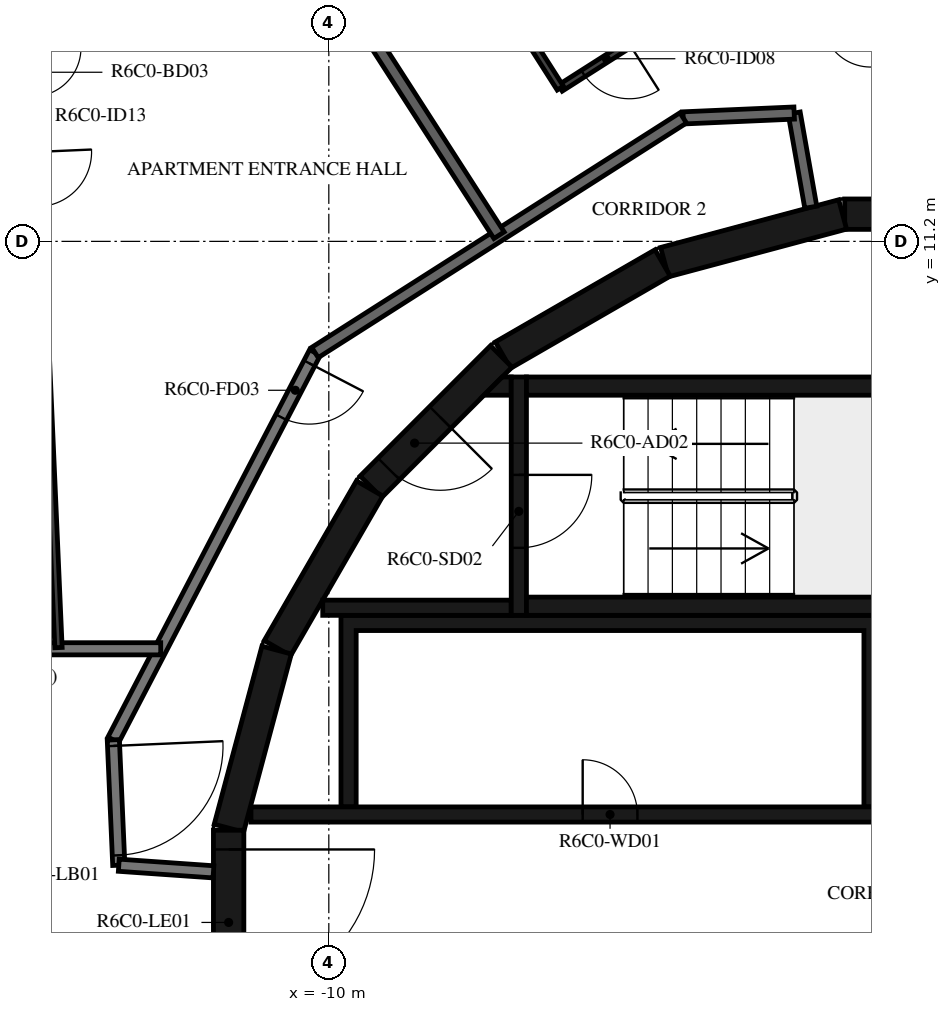
"""IFC4 building model, lengths in metres.
Left out: names, types, materials, properties, quantities, classifications, styles, units other than length and angle.
Written with IfcOpenShell. Run it as: python <this file> out.ifc"""

import sys

from ifc_helpers import new_model, si_unit, direction, frame, frame_2d, origin, place, context, subcontext, project, spatial, polyline, rectangle, outline, extrude, element, fill, save


model = new_model("IFC4")
c1 = context("Model", 3, precision=1e-05, world=origin(), true_north=direction((0.0, 1.0)))
c2 = subcontext(c1, "Body", "Model", "MODEL_VIEW")
j1 = project(units=[si_unit("LENGTHUNIT", "METRE"), si_unit("PLANEANGLEUNIT", "RADIAN")], contexts=[c1])
p1 = place(None, origin())
s1 = spatial("IfcSite", under=j1, at=p1, CompositionType="ELEMENT")
p2 = place(p1, origin())
s2 = spatial("IfcBuilding", under=s1, at=p2, CompositionType="ELEMENT")
p3 = place(p2, frame((0.0, 0.0, 254.7)))
s3 = spatial("IfcBuildingStorey", under=s2, at=p3, CompositionType="ELEMENT", Elevation=254.7)
for number, where, z_axis, x_axis in (
    (1, (1.516, 11.647, 0.0), (0.0, 0.0, 1.0), (-1.0, 0.0, 0.0)),
    (2, (-1.55, 11.643, 0.0), (0.0, 0.0, 1.0), (-0.966, -0.259, 0.0)),
    (3, (-4.51, 10.845, 0.0), (0.0, 0.0, 1.0), (-0.866, -0.5, 0.0)),
):
    element("IfcWall", number, at=place(p3, frame(where, z_axis=z_axis, x_axis=x_axis)), inside=s3, PredefinedType="SHEAR", context=c2, shape_type="SweptSolid", body=[
        extrude(rectangle(XDim=3.033, YDim=0.5, at=frame_2d((1.516, 0.0))), origin(), (0.0, 0.0, 1.0), 3.05),
    ])
p4 = place(p3, frame((-7.164, 9.308, 0.0), z_axis=(0.0, 0.0, 1.0), x_axis=(-0.707106781187, -0.707106781187, 0.0)))
e4 = element("IfcWall", 4, at=p4, inside=s3, PredefinedType="SHEAR", context=c2, shape_type="SweptSolid", body=[
    extrude(rectangle(XDim=3.032, YDim=0.5, at=frame_2d((1.516, 0.0))), origin(), (0.0, 0.0, 1.0), 3.05),
])
p5 = place(p4, frame((1.416, 0.0, 0.0)))
e5 = element("IfcOpeningElement", 5, at=p5, cuts=e4, PredefinedType="OPENING", context=c2, shape_type="SweptSolid", body=[
    extrude(rectangle(XDim=1.2, YDim=2.1, at=frame_2d((0.6, 1.05))), frame((0.0, 0.26, 0.0), z_axis=(0.0, -1.0, 0.0), x_axis=(1.0, 0.0, 0.0)), (0.0, 0.0, 1.0), 0.52),
])
for number, where, z_axis, x_axis in (
    (6, (-9.329, 7.137, 0.0), (0.0, 0.0, 1.0), (-0.5, -0.866, 0.0)),
    (7, (-10.858, 4.479, 0.0), (0.0, 0.0, 1.0), (-0.259, -0.966, 0.0)),
):
    element("IfcWall", number, at=place(p3, frame(where, z_axis=z_axis, x_axis=x_axis)), inside=s3, PredefinedType="SHEAR", context=c2, shape_type="SweptSolid", body=[
        extrude(rectangle(XDim=3.033, YDim=0.5, at=frame_2d((1.516, 0.0))), origin(), (0.0, 0.0, 1.0), 3.05),
    ])
p6 = place(p3, frame((-11.647, 1.516, 0.0), z_axis=(0.0, 0.0, 1.0), x_axis=(0.0, -1.0, 0.0)))
e8 = element("IfcWall", 8, at=p6, inside=s3, PredefinedType="SHEAR", context=c2, shape_type="SweptSolid", body=[
    extrude(rectangle(XDim=3.033, YDim=0.5, at=frame_2d((1.516, 0.0))), origin(), (0.0, 0.0, 1.0), 3.05),
])
p7 = place(p6, frame((0.316, 0.0, 0.0)))
e9 = element("IfcOpeningElement", 9, at=p7, cuts=e8, PredefinedType="OPENING", context=c2, shape_type="SweptSolid", body=[
    extrude(rectangle(XDim=2.4, YDim=2.1, at=frame_2d((1.2, 1.05))), frame((0.0, 0.26, 0.0), z_axis=(0.0, -1.0, 0.0), x_axis=(1.0, 0.0, 0.0)), (0.0, 0.0, 1.0), 0.52),
])
for number, where, z_axis, x_axis in (
    (10, (-6.75, 5.2, 0.0), (0.0, 0.0, 1.0), (1.0, 0.0, 0.0)),
    (11, (-6.75, 8.82, 0.0), (0.0, 0.0, 1.0), (1.0, 0.0, 0.0)),
):
    element("IfcWall", number, at=place(p3, frame(where, z_axis=z_axis, x_axis=x_axis)), inside=s3, PredefinedType="SHEAR", context=c2, shape_type="SweptSolid", body=[
        extrude(rectangle(XDim=6.75, YDim=0.3, at=frame_2d((3.375, 0.0))), origin(), (0.0, 0.0, 1.0), 3.05),
    ])
p8 = place(p3, frame((-6.875, 8.97, 0.0), z_axis=(0.0, 0.0, 1.0), x_axis=(0.0, -1.0, 0.0)))
e12 = element("IfcWall", 12, at=p8, inside=s3, PredefinedType="SHEAR", context=c2, shape_type="SweptSolid", body=[
    extrude(rectangle(XDim=3.92, YDim=0.25, at=frame_2d((1.96, 0.0))), origin(), (0.0, 0.0, 1.0), 3.05),
])
p9 = place(p8, frame((1.61, 0.0, 0.0)))
e13 = element("IfcOpeningElement", 13, at=p9, cuts=e12, PredefinedType="OPENING", context=c2, shape_type="SweptSolid", body=[
    extrude(rectangle(XDim=1.2, YDim=2.1, at=frame_2d((0.6, 1.05))), frame((0.0, 0.135, 0.0), z_axis=(0.0, -1.0, 0.0), x_axis=(1.0, 0.0, 0.0)), (0.0, 0.0, 1.0), 0.27),
])
p10 = place(p3, frame((-7.0, 5.175, 0.0), z_axis=(0.0, 0.0, 1.0), x_axis=(-1.0, 0.0, 0.0)))
e14 = element("IfcWall", 14, at=p10, inside=s3, PredefinedType="SHEAR", context=c2, shape_type="SweptSolid", body=[
    extrude(rectangle(XDim=3.1, YDim=0.25, at=frame_2d((1.55, 0.0))), origin(), (0.0, 0.0, 1.0), 3.05),
])
p11 = place(p3, origin())
e15 = element("IfcWall", 15, at=p11, inside=s3, PredefinedType="SHEAR", context=c2, shape_type="SweptSolid", body=[
    extrude(outline(polyline([(-7.148, 8.97), (-7.0, 8.97), (-7.0, 8.67), (-7.448, 8.67), (-7.148, 8.97)])), origin(), (0.0, 0.0, 1.0), 3.05),
])
p12 = place(p3, origin())
e16 = element("IfcWall", 16, at=p12, inside=s3, PredefinedType="SHEAR", context=c2, shape_type="SweptSolid", body=[
    extrude(outline(polyline([(-9.55, 4.8), (-1.2, 4.8), (-1.2, 1.9), (-0.95, 1.9), (-0.95, 4.8), (0.95, 4.8), (0.95, 1.9), (1.2, 1.9), (1.2, 4.8), (3.1, 4.8), (3.1, 1.9), (3.35, 1.9), (3.35, 4.8), (5.25, 4.8), (5.25, 1.9), (5.5, 1.9), (5.5, 4.8), (7.4, 4.8), (7.4, 1.9), (7.65, 1.9), (7.65, 4.8), (9.55, 4.8), (9.55, 1.9), (9.8, 1.9), (9.8, 4.8), (9.8, 5.05), (-9.8, 5.05), (-9.8, 4.8), (-9.8, 1.9), (-9.55, 1.9), (-9.55, 4.8)])), origin(), (0.0, 0.0, 1.0), 3.05),
])
p13 = place(p3, frame((-11.28, 1.775, 0.0), z_axis=(0.0, 0.0, 1.0), x_axis=(1.0, 0.0, 0.0)))
e17 = element("IfcWall", 17, at=p13, inside=s3, PredefinedType="SHEAR", context=c2, shape_type="SweptSolid", body=[
    extrude(rectangle(XDim=14.38, YDim=0.25, at=frame_2d((7.19, 0.0))), origin(), (0.0, 0.0, 1.0), 3.05),
])
p14 = place(p13, frame((10.73, 0.0, 0.0)))
e18 = element("IfcOpeningElement", 18, at=p14, cuts=e17, PredefinedType="OPENING", context=c2, shape_type="SweptSolid", body=[
    extrude(rectangle(XDim=1.1, YDim=2.1, at=frame_2d((0.55, 1.05))), frame((0.0, 0.135, 0.0), z_axis=(0.0, -1.0, 0.0), x_axis=(1.0, 0.0, 0.0)), (0.0, 0.0, 1.0), 0.27),
])
p15 = place(p13, frame((12.88, 0.0, 0.0)))
e19 = element("IfcOpeningElement", 19, at=p15, cuts=e17, PredefinedType="OPENING", context=c2, shape_type="SweptSolid", body=[
    extrude(rectangle(XDim=1.1, YDim=2.1, at=frame_2d((0.55, 1.05))), frame((0.0, 0.135, 0.0), z_axis=(0.0, -1.0, 0.0), x_axis=(1.0, 0.0, 0.0)), (0.0, 0.0, 1.0), 0.27),
])
p16 = place(p13, frame((5.455, 0.0, 0.0)))
e20 = element("IfcOpeningElement", 20, at=p16, cuts=e17, PredefinedType="OPENING", context=c2, shape_type="SweptSolid", body=[
    extrude(rectangle(XDim=0.9, YDim=2.1, at=frame_2d((0.45, 1.05))), frame((0.0, 0.135, 0.0), z_axis=(0.0, -1.0, 0.0), x_axis=(1.0, 0.0, 0.0)), (0.0, 0.0, 1.0), 0.27),
])
p17 = place(p3, frame((-10.228, 9.372, 0.0), z_axis=(0.0, 0.0, 1.0), x_axis=(-0.461759464021, -0.887005184532, 0.0)))
e21 = element("IfcWall", 21, at=p17, inside=s3, PredefinedType="STANDARD", context=c2, shape_type="SweptSolid", body=[
    extrude(rectangle(XDim=7.181, YDim=0.2, at=frame_2d((3.591, 0.0))), origin(), (0.0, 0.0, 1.0), 3.05),
])
p18 = place(p17, frame((0.2, 0.0, 0.0)))
e22 = element("IfcOpeningElement", 22, at=p18, cuts=e21, PredefinedType="OPENING", context=c2, shape_type="SweptSolid", body=[
    extrude(rectangle(XDim=1.0, YDim=2.1, at=frame_2d((0.5, 1.05))), frame((0.0, 0.11, 0.0), z_axis=(0.0, -1.0, 0.0), x_axis=(1.0, 0.0, 0.0)), (0.0, 0.0, 1.0), 0.22),
])
p19 = place(p3, frame((-13.544, 3.003, 0.0), z_axis=(0.0, 0.0, 1.0), x_axis=(0.043652842459, -0.99904676034, 0.0)))
e23 = element("IfcWall", 23, at=p19, inside=s3, PredefinedType="STANDARD", context=c2, shape_type="SweptSolid", body=[
    extrude(rectangle(XDim=2.064, YDim=0.2, at=frame_2d((1.032, 0.0))), origin(), (0.0, 0.0, 1.0), 3.05),
])
p20 = place(p19, frame((0.1, 0.0, 0.0)))
e24 = element("IfcOpeningElement", 24, at=p20, cuts=e23, PredefinedType="OPENING", context=c2, shape_type="SweptSolid", body=[
    extrude(rectangle(XDim=1.8, YDim=2.1, at=frame_2d((0.9, 1.05))), frame((0.0, 0.11, 0.0), z_axis=(0.0, -1.0, 0.0), x_axis=(1.0, 0.0, 0.0)), (0.0, 0.0, 1.0), 0.22),
])
p21 = place(p3, frame((-13.454, 0.941, 0.0), z_axis=(0.0, 0.0, 1.0), x_axis=(0.99755155062, -0.069934997354, 0.0)))
e25 = element("IfcWall", 25, at=p21, inside=s3, PredefinedType="STANDARD", context=c2, shape_type="SweptSolid", body=[
    extrude(rectangle(XDim=1.561, YDim=0.2, at=frame_2d((0.78, 0.0))), origin(), (0.0, 0.0, 1.0), 3.05),
])
p22 = place(p3, frame((-2.074, 11.761, 0.0), z_axis=(0.0, 0.0, 1.0), x_axis=(-0.173679082312, 0.984802303189, 0.0)))
e26 = element("IfcWall", 26, at=p22, inside=s3, PredefinedType="STANDARD", context=c2, shape_type="SweptSolid", body=[
    extrude(rectangle(XDim=1.573, YDim=0.2, at=frame_2d((0.787, 0.0))), origin(), (0.0, 0.0, 1.0), 3.05),
])
p23 = place(p3, frame((-2.347, 13.31, 0.0), z_axis=(0.0, 0.0, 1.0), x_axis=(-0.999050095671, -0.043576442492, 0.0)))
e27 = element("IfcWall", 27, at=p23, inside=s3, PredefinedType="STANDARD", context=c2, shape_type="SweptSolid", body=[
    extrude(rectangle(XDim=1.826, YDim=0.2, at=frame_2d((0.913, 0.0))), origin(), (0.0, 0.0, 1.0), 3.05),
])
p24 = place(p3, frame((-4.172, 13.231, 0.0), z_axis=(0.0, 0.0, 1.0), x_axis=(-0.843388394728, -0.537304397561, 0.0)))
e28 = element("IfcWall", 28, at=p24, inside=s3, PredefinedType="STANDARD", context=c2, shape_type="SweptSolid", body=[
    extrude(rectangle(XDim=7.181, YDim=0.2, at=frame_2d((3.59, 0.0))), origin(), (0.0, 0.0, 1.0), 3.05),
])
p25 = place(p3, frame((-12.764, 4.5, 0.0), z_axis=(0.0, 0.0, 1.0), x_axis=(-1.0, 0.0, 0.0)))
e29 = element("IfcWall", 29, at=p25, inside=s3, PredefinedType="STANDARD", context=c2, shape_type="SweptSolid", body=[
    extrude(rectangle(XDim=5.135, YDim=0.2, at=frame_2d((2.568, 0.0))), origin(), (0.0, 0.0, 1.0), 3.05),
])
p26 = place(p3, frame((-9.69, 15.171, 0.0), z_axis=(0.0, 0.0, 1.0), x_axis=(0.540961372678, -0.841047438181, 0.0)))
e30 = element("IfcWall", 30, at=p26, inside=s3, PredefinedType="STANDARD", context=c2, shape_type="SweptSolid", body=[
    extrude(rectangle(XDim=4.602, YDim=0.2, at=frame_2d((2.301, 0.0))), origin(), (0.0, 0.0, 1.0), 3.05),
])
p27 = place(p3, frame((-4.888, 14.553, 0.0), z_axis=(0.0, 0.0, 1.0), x_axis=(-0.843349608892, -0.537365273517, 0.0)))
e31 = element("IfcWall", 31, at=p27, inside=s3, PredefinedType="PARTITIONING", context=c2, shape_type="SweptSolid", body=[
    extrude(rectangle(XDim=1.548, YDim=0.12, at=frame_2d((0.774, 0.0))), origin(), (0.0, 0.0, 1.0), 3.05),
])
p28 = place(p27, frame((0.2, 0.0, 0.0)))
e32 = element("IfcOpeningElement", 32, at=p28, cuts=e31, PredefinedType="OPENING", context=c2, shape_type="SweptSolid", body=[
    extrude(rectangle(XDim=0.9, YDim=2.1, at=frame_2d((0.45, 1.05))), frame((0.0, 0.07, 0.0), z_axis=(0.0, -1.0, 0.0), x_axis=(1.0, 0.0, 0.0)), (0.0, 0.0, 1.0), 0.14),
])
p29 = place(p3, frame((-6.194, 13.721, 0.0), z_axis=(0.0, 0.0, 1.0), x_axis=(-0.537316807294, 0.843380488629, 0.0)))
e33 = element("IfcWall", 33, at=p29, inside=s3, PredefinedType="PARTITIONING", context=c2, shape_type="SweptSolid", body=[
    extrude(rectangle(XDim=4.331, YDim=0.12, at=frame_2d((2.165, 0.0))), origin(), (0.0, 0.0, 1.0), 3.05),
])
p30 = place(p3, frame((-14.955, 16.187, 0.0), z_axis=(0.0, 0.0, 1.0), x_axis=(0.04360777668, -0.999048728448, 0.0)))
e34 = element("IfcWall", 34, at=p30, inside=s3, PredefinedType="PARTITIONING", context=c2, shape_type="SweptSolid", body=[
    extrude(rectangle(XDim=11.679, YDim=0.12, at=frame_2d((5.839, 0.0))), origin(), (0.0, 0.0, 1.0), 3.05),
])
p31 = place(p30, frame((1.808, 0.0, 0.0)))
e35 = element("IfcOpeningElement", 35, at=p31, cuts=e34, PredefinedType="OPENING", context=c2, shape_type="SweptSolid", body=[
    extrude(rectangle(XDim=0.8, YDim=2.1, at=frame_2d((0.4, 1.05))), frame((0.0, 0.07, 0.0), z_axis=(0.0, -1.0, 0.0), x_axis=(1.0, 0.0, 0.0)), (0.0, 0.0, 1.0), 0.14),
])
p32 = place(p30, frame((3.519, 0.0, 0.0)))
e36 = element("IfcOpeningElement", 36, at=p32, cuts=e34, PredefinedType="OPENING", context=c2, shape_type="SweptSolid", body=[
    extrude(rectangle(XDim=0.9, YDim=2.1, at=frame_2d((0.45, 1.05))), frame((0.0, 0.07, 0.0), z_axis=(0.0, -1.0, 0.0), x_axis=(1.0, 0.0, 0.0)), (0.0, 0.0, 1.0), 0.14),
])
p33 = place(p9, origin())
e37 = element("IfcDoor", 37, at=p33, inside=s3, OperationType="SINGLE_SWING_LEFT", PredefinedType="DOOR", context=c2, shape_type="SweptSolid", body=[
    extrude(rectangle(XDim=1.2, YDim=2.1, at=frame_2d((0.6, 1.05))), frame((0.0, 0.025, 0.0), z_axis=(0.0, -1.0, 0.0), x_axis=(1.0, 0.0, 0.0)), (0.0, 0.0, 1.0), 0.05),
])
fill(e13, e37)
p34 = place(p5, origin())
e38 = element("IfcDoor", 38, at=p34, inside=s3, OperationType="SINGLE_SWING_RIGHT", PredefinedType="DOOR", context=c2, shape_type="SweptSolid", body=[
    extrude(rectangle(XDim=1.2, YDim=2.1, at=frame_2d((0.6, 1.05))), frame((0.0, 0.025, 0.0), z_axis=(0.0, -1.0, 0.0), x_axis=(1.0, 0.0, 0.0)), (0.0, 0.0, 1.0), 0.05),
])
fill(e5, e38)
p35 = place(p7, origin())
e39 = element("IfcDoor", 39, at=p35, inside=s3, OperationType="DOUBLE_DOOR_SINGLE_SWING", PredefinedType="DOOR", context=c2, shape_type="SweptSolid", body=[
    extrude(rectangle(XDim=2.4, YDim=2.1, at=frame_2d((1.2, 1.05))), frame((0.0, 0.025, 0.0), z_axis=(0.0, -1.0, 0.0), x_axis=(1.0, 0.0, 0.0)), (0.0, 0.0, 1.0), 0.05),
])
fill(e9, e39)
p36 = place(p16, origin())
e40 = element("IfcDoor", 40, at=p36, inside=s3, OperationType="SINGLE_SWING_LEFT", PredefinedType="DOOR", context=c2, shape_type="SweptSolid", body=[
    extrude(rectangle(XDim=0.9, YDim=2.1, at=frame_2d((0.45, 1.05))), frame((0.0, 0.025, 0.0), z_axis=(0.0, -1.0, 0.0), x_axis=(1.0, 0.0, 0.0)), (0.0, 0.0, 1.0), 0.05),
])
fill(e20, e40)
p37 = place(p28, origin())
e41 = element("IfcDoor", 41, at=p37, inside=s3, OperationType="SINGLE_SWING_RIGHT", PredefinedType="DOOR", context=c2, shape_type="SweptSolid", body=[
    extrude(rectangle(XDim=0.9, YDim=2.1, at=frame_2d((0.45, 1.05))), frame((0.0, 0.025, 0.0), z_axis=(0.0, -1.0, 0.0), x_axis=(1.0, 0.0, 0.0)), (0.0, 0.0, 1.0), 0.05),
])
fill(e32, e41)
p38 = place(p18, origin())
e42 = element("IfcDoor", 42, at=p38, inside=s3, OperationType="SINGLE_SWING_LEFT", PredefinedType="DOOR", context=c2, shape_type="SweptSolid", body=[
    extrude(rectangle(XDim=1.0, YDim=2.1, at=frame_2d((0.5, 1.05))), frame((0.0, 0.025, 0.0), z_axis=(0.0, -1.0, 0.0), x_axis=(1.0, 0.0, 0.0)), (0.0, 0.0, 1.0), 0.05),
])
fill(e22, e42)
p39 = place(p20, origin())
e43 = element("IfcDoor", 43, at=p39, inside=s3, OperationType="DOUBLE_DOOR_SINGLE_SWING", PredefinedType="DOOR", context=c2, shape_type="SweptSolid", body=[
    extrude(rectangle(XDim=1.8, YDim=2.1, at=frame_2d((0.9, 1.05))), frame((0.0, 0.025, 0.0), z_axis=(0.0, -1.0, 0.0), x_axis=(1.0, 0.0, 0.0)), (0.0, 0.0, 1.0), 0.05),
])
fill(e24, e43)
save(model, sys.argv[1])
